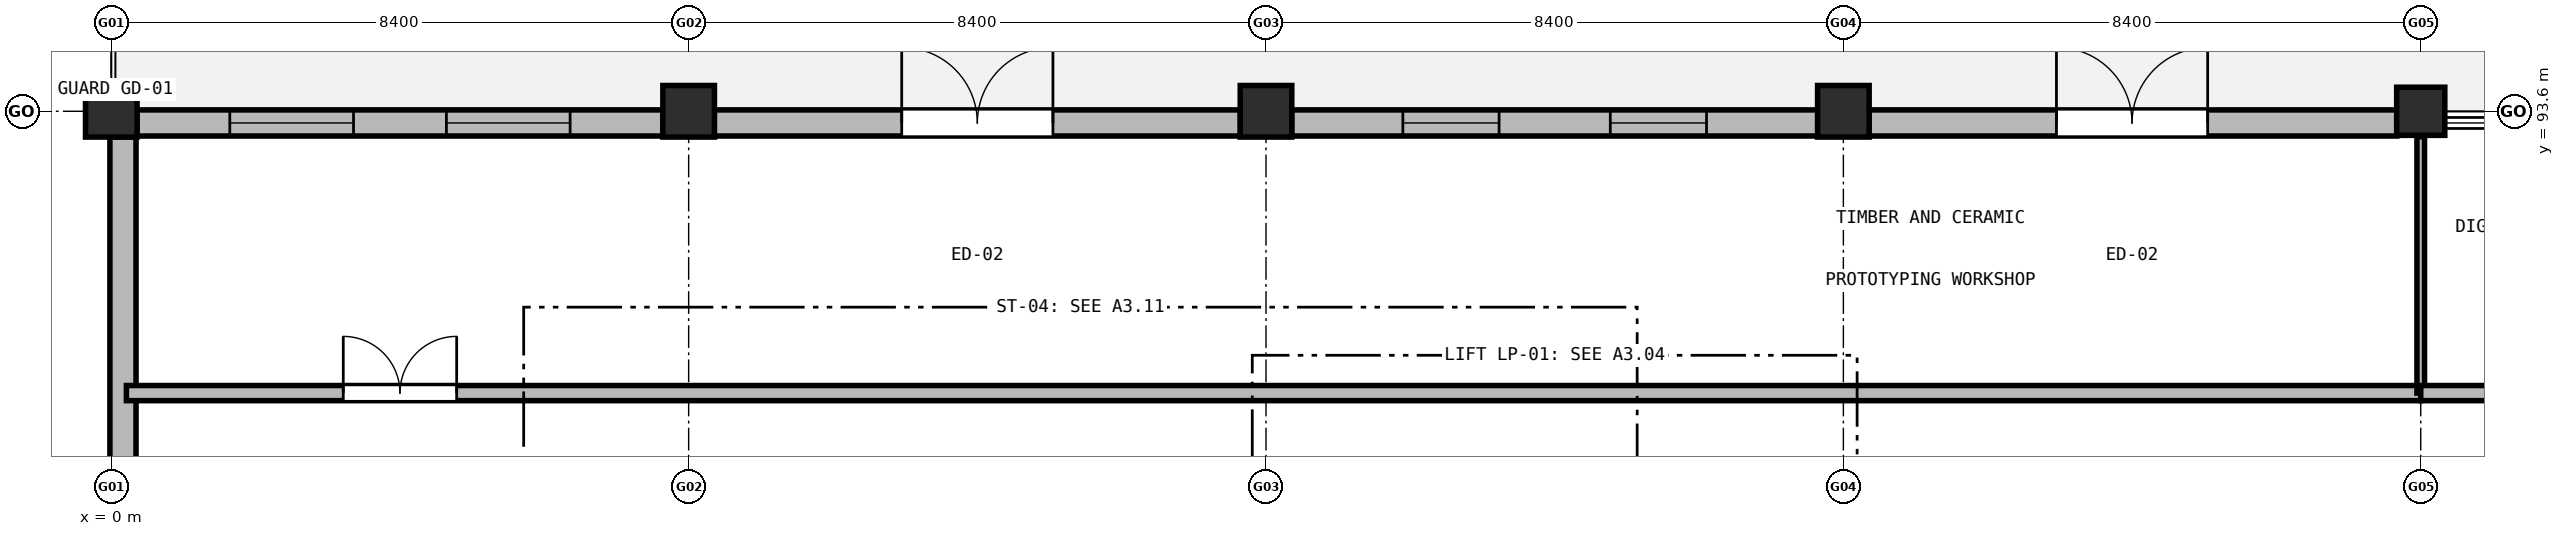
"""IFC4 building model, lengths in metres.
Left out: names, types, materials, properties, quantities, classifications, styles, units other than length and angle.
Written with IfcOpenShell. Run it as: python <this file> out.ifc"""

import sys

from ifc_helpers import new_model, si_unit, direction, frame, frame_2d, origin, origin_2d, place, context, subcontext, project, spatial, rectangle, extrude, element, fill, save


model = new_model("IFC4")
c1 = context("Model", 3, precision=1e-05, world=origin(), true_north=direction((0.0, 1.0)))
c2 = subcontext(c1, "Body", "Model", "MODEL_VIEW")
j1 = project(units=[si_unit("LENGTHUNIT", "METRE"), si_unit("PLANEANGLEUNIT", "RADIAN")], contexts=[c1])
p1 = place(None, origin())
s1 = spatial("IfcSite", under=j1, at=p1, CompositionType="ELEMENT")
p2 = place(p1, origin())
s2 = spatial("IfcBuilding", under=s1, at=p2, CompositionType="ELEMENT")
p3 = place(p2, origin())
s3 = spatial("IfcBuildingStorey", under=s2, at=p3, CompositionType="ELEMENT", Elevation=0.0)
for number, where, z_axis, x_axis in (
    (1, (0.0, 93.6, 0.0), (0.0, 0.0, 1.0), (1.0, 0.0, 0.0)),
    (2, (8.4, 93.6, 0.0), (0.0, 0.0, 1.0), (1.0, 0.0, 0.0)),
    (3, (16.8, 93.6, 0.0), (0.0, 0.0, 1.0), (1.0, 0.0, 0.0)),
    (4, (25.2, 93.6, 0.0), (0.0, 0.0, 1.0), (1.0, 0.0, 0.0)),
):
    element("IfcColumn", number, at=place(p3, frame(where, z_axis=z_axis, x_axis=x_axis)), inside=s3, PredefinedType="COLUMN", context=c2, shape_type="SweptSolid", body=[
        extrude(rectangle(XDim=0.75, YDim=0.75, at=origin_2d()), origin(), (0.0, 0.0, 1.0), 5.1),
    ])
p4 = place(p3, frame((33.6, 93.6, 0.0), z_axis=(0.0, 0.0, 1.0), x_axis=(1.0, 0.0, 0.0)))
e5 = element("IfcColumn", 5, at=p4, inside=s3, PredefinedType="COLUMN", context=c2, shape_type="SweptSolid", body=[
    extrude(rectangle(XDim=0.7, YDim=0.7, at=origin_2d()), origin(), (0.0, 0.0, 1.0), 5.1),
])
p5 = place(p3, frame((0.17, 86.773, 0.0), z_axis=(0.0, 0.0, 1.0), x_axis=(0.0, 1.0, 0.0)))
e6 = element("IfcWall", 6, at=p5, inside=s3, PredefinedType="SOLIDWALL", context=c2, shape_type="SweptSolid", body=[
    extrude(rectangle(XDim=6.454, YDim=0.38, at=frame_2d((3.227, 0.0))), origin(), (0.0, 0.0, 1.0), 4.11),
])
p6 = place(p3, frame((0.373, 93.43, 0.0), z_axis=(0.0, 0.0, 1.0), x_axis=(1.0, 0.0, 0.0)))
e7 = element("IfcWall", 7, at=p6, inside=s3, PredefinedType="SOLIDWALL", context=c2, shape_type="SweptSolid", body=[
    extrude(rectangle(XDim=7.654, YDim=0.38, at=frame_2d((3.827, 0.0))), origin(), (0.0, 0.0, 1.0), 4.01),
])
p7 = place(p6, frame((1.351, 0.0, 0.95)))
e8 = element("IfcOpeningElement", 8, at=p7, cuts=e7, PredefinedType="OPENING", context=c2, shape_type="SweptSolid", body=[
    extrude(rectangle(XDim=1.8, YDim=2.0, at=frame_2d((0.9, 1.0))), frame((0.0, 0.2, 0.0), z_axis=(0.0, -1.0, 0.0), x_axis=(1.0, 0.0, 0.0)), (0.0, 0.0, 1.0), 0.4),
])
p8 = place(p6, frame((4.503, 0.0, 0.95)))
e9 = element("IfcOpeningElement", 9, at=p8, cuts=e7, PredefinedType="OPENING", context=c2, shape_type="SweptSolid", body=[
    extrude(rectangle(XDim=1.8, YDim=2.0, at=frame_2d((0.9, 1.0))), frame((0.0, 0.2, 0.0), z_axis=(0.0, -1.0, 0.0), x_axis=(1.0, 0.0, 0.0)), (0.0, 0.0, 1.0), 0.4),
])
p9 = place(p3, frame((8.773, 93.43, 0.0), z_axis=(0.0, 0.0, 1.0), x_axis=(1.0, 0.0, 0.0)))
e10 = element("IfcWall", 10, at=p9, inside=s3, PredefinedType="SOLIDWALL", context=c2, shape_type="SweptSolid", body=[
    extrude(rectangle(XDim=7.654, YDim=0.38, at=frame_2d((3.827, 0.0))), origin(), (0.0, 0.0, 1.0), 4.01),
])
p10 = place(p9, frame((2.727, 0.0, 0.0)))
e11 = element("IfcOpeningElement", 11, at=p10, cuts=e10, PredefinedType="OPENING", context=c2, shape_type="SweptSolid", body=[
    extrude(rectangle(XDim=2.2, YDim=2.4, at=frame_2d((1.1, 1.2))), frame((0.0, 0.2, 0.0), z_axis=(0.0, -1.0, 0.0), x_axis=(1.0, 0.0, 0.0)), (0.0, 0.0, 1.0), 0.4),
])
p11 = place(p3, frame((17.173, 93.43, 0.0), z_axis=(0.0, 0.0, 1.0), x_axis=(1.0, 0.0, 0.0)))
e12 = element("IfcWall", 12, at=p11, inside=s3, PredefinedType="SOLIDWALL", context=c2, shape_type="SweptSolid", body=[
    extrude(rectangle(XDim=7.654, YDim=0.38, at=frame_2d((3.827, 0.0))), origin(), (0.0, 0.0, 1.0), 4.01),
])
p12 = place(p11, frame((1.618, 0.0, 0.95)))
e13 = element("IfcOpeningElement", 13, at=p12, cuts=e12, PredefinedType="OPENING", context=c2, shape_type="SweptSolid", body=[
    extrude(rectangle(XDim=1.4, YDim=1.9, at=frame_2d((0.7, 0.95))), frame((0.0, 0.2, 0.0), z_axis=(0.0, -1.0, 0.0), x_axis=(1.0, 0.0, 0.0)), (0.0, 0.0, 1.0), 0.4),
])
p13 = place(p11, frame((4.636, 0.0, 0.95)))
e14 = element("IfcOpeningElement", 14, at=p13, cuts=e12, PredefinedType="OPENING", context=c2, shape_type="SweptSolid", body=[
    extrude(rectangle(XDim=1.4, YDim=1.9, at=frame_2d((0.7, 0.95))), frame((0.0, 0.2, 0.0), z_axis=(0.0, -1.0, 0.0), x_axis=(1.0, 0.0, 0.0)), (0.0, 0.0, 1.0), 0.4),
])
p14 = place(p3, frame((25.573, 93.43, 0.0), z_axis=(0.0, 0.0, 1.0), x_axis=(1.0, 0.0, 0.0)))
e15 = element("IfcWall", 15, at=p14, inside=s3, PredefinedType="SOLIDWALL", context=c2, shape_type="SweptSolid", body=[
    extrude(rectangle(XDim=7.679, YDim=0.38, at=frame_2d((3.839, 0.0))), origin(), (0.0, 0.0, 1.0), 4.01),
])
p15 = place(p14, frame((2.727, 0.0, 0.0)))
e16 = element("IfcOpeningElement", 16, at=p15, cuts=e15, PredefinedType="OPENING", context=c2, shape_type="SweptSolid", body=[
    extrude(rectangle(XDim=2.2, YDim=2.4, at=frame_2d((1.1, 1.2))), frame((0.0, 0.2, 0.0), z_axis=(0.0, -1.0, 0.0), x_axis=(1.0, 0.0, 0.0)), (0.0, 0.0, 1.0), 0.4),
])
p16 = place(p3, frame((0.22, 89.5, 0.0), z_axis=(0.0, 0.0, 1.0), x_axis=(1.0, 0.0, 0.0)))
e17 = element("IfcWall", 17, at=p16, inside=s3, PredefinedType="SOLIDWALL", context=c2, shape_type="SweptSolid", body=[
    extrude(rectangle(XDim=33.38, YDim=0.22, at=frame_2d((16.69, 0.0))), origin(), (0.0, 0.0, 1.0), 4.105),
])
p17 = place(p16, frame((3.155, 0.0, 0.0)))
e18 = element("IfcOpeningElement", 18, at=p17, cuts=e17, PredefinedType="OPENING", context=c2, shape_type="SweptSolid", body=[
    extrude(rectangle(XDim=1.65, YDim=2.2, at=frame_2d((0.825, 1.1))), frame((0.0, 0.12, 0.0), z_axis=(0.0, -1.0, 0.0), x_axis=(1.0, 0.0, 0.0)), (0.0, 0.0, 1.0), 0.24),
])
p18 = place(p3, frame((33.6, 89.5, 0.0), z_axis=(0.0, 0.0, 1.0), x_axis=(0.0, 1.0, 0.0)))
e19 = element("IfcWall", 19, at=p18, inside=s3, PredefinedType="PARTITIONING", context=c2, shape_type="SweptSolid", body=[
    extrude(rectangle(XDim=3.73, YDim=0.11, at=frame_2d((1.865, 0.0))), origin(), (0.0, 0.0, 1.0), 4.005),
])
p19 = place(p3, frame((33.6, 89.5, 0.0), z_axis=(0.0, 0.0, 1.0), x_axis=(1.0, 0.0, 0.0)))
e20 = element("IfcWall", 20, at=p19, inside=s3, PredefinedType="SOLIDWALL", context=c2, shape_type="SweptSolid", body=[
    extrude(rectangle(XDim=33.6, YDim=0.22, at=frame_2d((16.8, 0.0))), origin(), (0.0, 0.0, 1.0), 4.105),
])
p20 = place(p19, frame((3.55, 0.0, 0.0)))
e21 = element("IfcOpeningElement", 21, at=p20, cuts=e20, PredefinedType="OPENING", context=c2, shape_type="SweptSolid", body=[
    extrude(rectangle(XDim=1.3, YDim=2.15, at=frame_2d((0.65, 1.075))), frame((0.0, 0.12, 0.0), z_axis=(0.0, -1.0, 0.0), x_axis=(1.0, 0.0, 0.0)), (0.0, 0.0, 1.0), 0.24),
])
p21 = place(p7, origin())
e22 = element("IfcWindow", 22, at=p21, inside=s3, PartitioningType="SINGLE_PANEL", PredefinedType="WINDOW", context=c2, shape_type="SweptSolid", body=[
    extrude(rectangle(XDim=1.8, YDim=2.0, at=frame_2d((0.9, 1.0))), frame((0.0, 0.03, 0.0), z_axis=(0.0, -1.0, 0.0), x_axis=(1.0, 0.0, 0.0)), (0.0, 0.0, 1.0), 0.06),
])
fill(e8, e22)
p22 = place(p8, origin())
e23 = element("IfcWindow", 23, at=p22, inside=s3, PartitioningType="SINGLE_PANEL", PredefinedType="WINDOW", context=c2, shape_type="SweptSolid", body=[
    extrude(rectangle(XDim=1.8, YDim=2.0, at=frame_2d((0.9, 1.0))), frame((0.0, 0.03, 0.0), z_axis=(0.0, -1.0, 0.0), x_axis=(1.0, 0.0, 0.0)), (0.0, 0.0, 1.0), 0.06),
])
fill(e9, e23)
p23 = place(p10, origin())
e24 = element("IfcDoor", 24, at=p23, inside=s3, OperationType="DOUBLE_DOOR_SINGLE_SWING", PredefinedType="DOOR", context=c2, shape_type="SweptSolid", body=[
    extrude(rectangle(XDim=2.2, YDim=2.4, at=frame_2d((1.1, 1.2))), frame((0.0, 0.025, 0.0), z_axis=(0.0, -1.0, 0.0), x_axis=(1.0, 0.0, 0.0)), (0.0, 0.0, 1.0), 0.05),
])
fill(e11, e24)
p24 = place(p12, origin())
e25 = element("IfcWindow", 25, at=p24, inside=s3, PartitioningType="SINGLE_PANEL", PredefinedType="WINDOW", context=c2, shape_type="SweptSolid", body=[
    extrude(rectangle(XDim=1.4, YDim=1.9, at=frame_2d((0.7, 0.95))), frame((0.0, 0.03, 0.0), z_axis=(0.0, -1.0, 0.0), x_axis=(1.0, 0.0, 0.0)), (0.0, 0.0, 1.0), 0.06),
])
fill(e13, e25)
p25 = place(p13, origin())
e26 = element("IfcWindow", 26, at=p25, inside=s3, PartitioningType="SINGLE_PANEL", PredefinedType="WINDOW", context=c2, shape_type="SweptSolid", body=[
    extrude(rectangle(XDim=1.4, YDim=1.9, at=frame_2d((0.7, 0.95))), frame((0.0, 0.03, 0.0), z_axis=(0.0, -1.0, 0.0), x_axis=(1.0, 0.0, 0.0)), (0.0, 0.0, 1.0), 0.06),
])
fill(e14, e26)
p26 = place(p15, origin())
e27 = element("IfcDoor", 27, at=p26, inside=s3, OperationType="DOUBLE_DOOR_SINGLE_SWING", PredefinedType="DOOR", context=c2, shape_type="SweptSolid", body=[
    extrude(rectangle(XDim=2.2, YDim=2.4, at=frame_2d((1.1, 1.2))), frame((0.0, 0.025, 0.0), z_axis=(0.0, -1.0, 0.0), x_axis=(1.0, 0.0, 0.0)), (0.0, 0.0, 1.0), 0.05),
])
fill(e16, e27)
p27 = place(p17, origin())
e28 = element("IfcDoor", 28, at=p27, inside=s3, OperationType="DOUBLE_DOOR_SINGLE_SWING", PredefinedType="DOOR", context=c2, shape_type="SweptSolid", body=[
    extrude(rectangle(XDim=1.65, YDim=2.2, at=frame_2d((0.825, 1.1))), frame((0.0, 0.025, 0.0), z_axis=(0.0, -1.0, 0.0), x_axis=(1.0, 0.0, 0.0)), (0.0, 0.0, 1.0), 0.05),
])
fill(e18, e28)
save(model, sys.argv[1])
